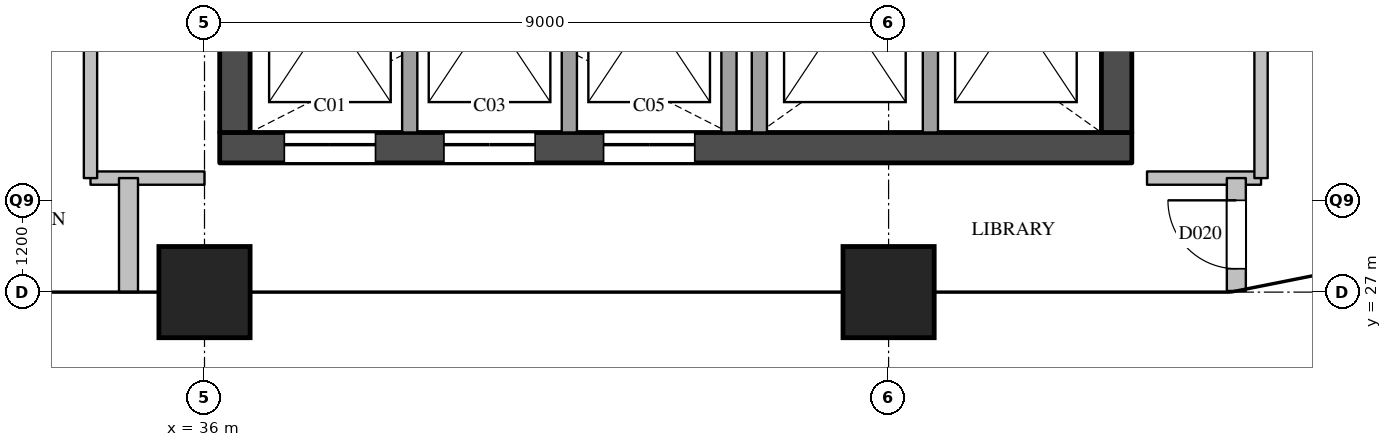
"""IFC4 building model, lengths in metres.
Left out: names, types, materials, properties, quantities, classifications, styles, units other than length and angle.
Written with IfcOpenShell. Run it as: python <this file> out.ifc"""

import sys

from ifc_helpers import new_model, si_unit, direction, frame, frame_2d, origin, origin_2d, place, context, subcontext, project, spatial, rectangle, extrude, element, fill, save


model = new_model("IFC4")
c1 = context("Model", 3, precision=1e-05, world=origin(), true_north=direction((0.0, 1.0)))
c2 = subcontext(c1, "Body", "Model", "MODEL_VIEW")
j1 = project(units=[si_unit("LENGTHUNIT", "METRE"), si_unit("PLANEANGLEUNIT", "RADIAN")], contexts=[c1])
p1 = place(None, origin())
s1 = spatial("IfcSite", under=j1, at=p1, CompositionType="ELEMENT")
p2 = place(p1, origin())
s2 = spatial("IfcBuilding", under=s1, at=p2, CompositionType="ELEMENT")
p3 = place(p2, frame((0.0, 0.0, 250.1)))
s3 = spatial("IfcBuildingStorey", under=s2, at=p3, CompositionType="ELEMENT", Elevation=250.1)
for number, where, z_axis, x_axis in (
    (1, (36.0, 27.0, 0.0), (0.0, 0.0, 1.0), (1.0, 0.0, 0.0)),
    (2, (45.0, 27.0, 0.0), (0.0, 0.0, 1.0), (1.0, 0.0, 0.0)),
):
    element("IfcColumn", number, at=place(p3, frame(where, z_axis=z_axis, x_axis=x_axis)), inside=s3, PredefinedType="COLUMN", context=c2, shape_type="SweptSolid", body=[
        extrude(rectangle(XDim=1.2, YDim=1.2, at=origin_2d()), origin(), (0.0, 0.0, 1.0), 3.9),
    ])
p4 = place(p3, frame((36.2, 28.9, 0.0), z_axis=(0.0, 0.0, 1.0), x_axis=(1.0, 0.0, 0.0)))
e3 = element("IfcWall", 3, at=p4, inside=s3, PredefinedType="SHEAR", context=c2, shape_type="SweptSolid", body=[
    extrude(rectangle(XDim=12.0, YDim=0.4, at=frame_2d((6.0, 0.0))), origin(), (0.0, 0.0, 1.0), 3.6),
])
p5 = place(p4, frame((0.85, 0.0, 0.0)))
e4 = element("IfcOpeningElement", 4, at=p5, cuts=e3, PredefinedType="OPENING", context=c2, shape_type="SweptSolid", body=[
    extrude(rectangle(XDim=1.2, YDim=2.1, at=frame_2d((0.6, 1.05))), frame((0.0, 0.21, 0.0), z_axis=(0.0, -1.0, 0.0), x_axis=(1.0, 0.0, 0.0)), (0.0, 0.0, 1.0), 0.42),
])
p6 = place(p4, frame((2.95, 0.0, 0.0)))
e5 = element("IfcOpeningElement", 5, at=p6, cuts=e3, PredefinedType="OPENING", context=c2, shape_type="SweptSolid", body=[
    extrude(rectangle(XDim=1.2, YDim=2.1, at=frame_2d((0.6, 1.05))), frame((0.0, 0.21, 0.0), z_axis=(0.0, -1.0, 0.0), x_axis=(1.0, 0.0, 0.0)), (0.0, 0.0, 1.0), 0.42),
])
p7 = place(p4, frame((5.05, 0.0, 0.0)))
e6 = element("IfcOpeningElement", 6, at=p7, cuts=e3, PredefinedType="OPENING", context=c2, shape_type="SweptSolid", body=[
    extrude(rectangle(XDim=1.2, YDim=2.1, at=frame_2d((0.6, 1.05))), frame((0.0, 0.21, 0.0), z_axis=(0.0, -1.0, 0.0), x_axis=(1.0, 0.0, 0.0)), (0.0, 0.0, 1.0), 0.42),
])
p8 = place(p3, frame((36.4, 29.1, 0.0), z_axis=(0.0, 0.0, 1.0), x_axis=(0.0, 1.0, 0.0)))
e7 = element("IfcWall", 7, at=p8, inside=s3, PredefinedType="SHEAR", context=c2, shape_type="SweptSolid", body=[
    extrude(rectangle(XDim=20.3, YDim=0.4, at=frame_2d((10.15, 0.0))), origin(), (0.0, 0.0, 1.0), 3.6),
])
p9 = place(p8, frame((3.6, 0.0, 0.0)))
e8 = element("IfcOpeningElement", 8, at=p9, cuts=e7, PredefinedType="OPENING", context=c2, shape_type="SweptSolid", body=[
    extrude(rectangle(XDim=1.8, YDim=2.1, at=frame_2d((0.9, 1.05))), frame((0.0, 0.21, 0.0), z_axis=(0.0, -1.0, 0.0), x_axis=(1.0, 0.0, 0.0)), (0.0, 0.0, 1.0), 0.42),
])
p10 = place(p8, frame((16.4, 0.0, 0.0)))
e9 = element("IfcOpeningElement", 9, at=p10, cuts=e7, PredefinedType="OPENING", context=c2, shape_type="SweptSolid", body=[
    extrude(rectangle(XDim=1.0, YDim=2.1, at=frame_2d((0.5, 1.05))), frame((0.0, 0.21, 0.0), z_axis=(0.0, -1.0, 0.0), x_axis=(1.0, 0.0, 0.0)), (0.0, 0.0, 1.0), 0.42),
])
p11 = place(p3, frame((48.0, 29.1, 0.0), z_axis=(0.0, 0.0, 1.0), x_axis=(0.0, 1.0, 0.0)))
e10 = element("IfcWall", 10, at=p11, inside=s3, PredefinedType="SHEAR", context=c2, shape_type="SweptSolid", body=[
    extrude(rectangle(XDim=20.3, YDim=0.4, at=frame_2d((10.15, 0.0))), origin(), (0.0, 0.0, 1.0), 3.6),
])
p12 = place(p11, frame((12.5, 0.0, 0.0)))
e11 = element("IfcOpeningElement", 11, at=p12, cuts=e10, PredefinedType="OPENING", context=c2, shape_type="SweptSolid", body=[
    extrude(rectangle(XDim=0.7, YDim=2.1, at=frame_2d((0.35, 1.05))), frame((0.0, 0.21, 0.0), z_axis=(0.0, -1.0, 0.0), x_axis=(1.0, 0.0, 0.0)), (0.0, 0.0, 1.0), 0.42),
])
p13 = place(p11, frame((3.9, 0.0, 0.0)))
e12 = element("IfcOpeningElement", 12, at=p13, cuts=e10, PredefinedType="OPENING", context=c2, shape_type="SweptSolid", body=[
    extrude(rectangle(XDim=1.8, YDim=2.1, at=frame_2d((0.9, 1.05))), frame((0.0, 0.21, 0.0), z_axis=(0.0, -1.0, 0.0), x_axis=(1.0, 0.0, 0.0)), (0.0, 0.0, 1.0), 0.42),
])
for number, where, z_axis, x_axis in (
    (13, (38.7, 29.1, 0.0), (0.0, 0.0, 1.0), (0.0, 1.0, 0.0)),
    (14, (40.8, 29.1, 0.0), (0.0, 0.0, 1.0), (0.0, 1.0, 0.0)),
    (15, (42.9, 29.1, 0.0), (0.0, 0.0, 1.0), (0.0, 1.0, 0.0)),
):
    element("IfcWall", number, at=place(p3, frame(where, z_axis=z_axis, x_axis=x_axis)), inside=s3, PredefinedType="SOLIDWALL", context=c2, shape_type="SweptSolid", body=[
        extrude(rectangle(XDim=3.2, YDim=0.2, at=frame_2d((1.6, 0.0))), origin(), (0.0, 0.0, 1.0), 3.6),
    ])
p14 = place(p3, frame((43.3, 29.1, 0.0), z_axis=(0.0, 0.0, 1.0), x_axis=(0.0, 1.0, 0.0)))
e16 = element("IfcWall", 16, at=p14, inside=s3, PredefinedType="SOLIDWALL", context=c2, shape_type="SweptSolid", body=[
    extrude(rectangle(XDim=9.9, YDim=0.2, at=frame_2d((4.95, 0.0))), origin(), (0.0, 0.0, 1.0), 3.6),
])
p15 = place(p3, frame((45.55, 29.1, 0.0), z_axis=(0.0, 0.0, 1.0), x_axis=(0.0, 1.0, 0.0)))
e17 = element("IfcWall", 17, at=p15, inside=s3, PredefinedType="SOLIDWALL", context=c2, shape_type="SweptSolid", body=[
    extrude(rectangle(XDim=3.2, YDim=0.2, at=frame_2d((1.6, 0.0))), origin(), (0.0, 0.0, 1.0), 3.6),
])
for number, where, z_axis, x_axis in (
    (18, (34.5, 28.5, 0.0), (0.0, 0.0, 1.0), (1.0, 0.0, 0.0)),
    (19, (48.4, 28.5, 0.0), (0.0, 0.0, 1.0), (1.0, 0.0, 0.0)),
):
    element("IfcWall", number, at=place(p3, frame(where, z_axis=z_axis, x_axis=x_axis)), inside=s3, PredefinedType="PARTITIONING", context=c2, shape_type="SweptSolid", body=[
        extrude(rectangle(XDim=1.5, YDim=0.175, at=frame_2d((0.75, 0.0))), origin(), (0.0, 0.0, 1.0), 3.6),
    ])
p16 = place(p3, frame((34.5, 28.5, 0.0), z_axis=(0.0, 0.0, 1.0), x_axis=(0.0, 1.0, 0.0)))
e20 = element("IfcWall", 20, at=p16, inside=s3, PredefinedType="PARTITIONING", context=c2, shape_type="SweptSolid", body=[
    extrude(rectangle(XDim=15.7, YDim=0.175, at=frame_2d((7.85, 0.0))), origin(), (0.0, 0.0, 1.0), 3.6),
])
p17 = place(p16, frame((10.1, 0.0, 0.0)))
e21 = element("IfcOpeningElement", 21, at=p17, cuts=e20, PredefinedType="OPENING", context=c2, shape_type="SweptSolid", body=[
    extrude(rectangle(XDim=1.0, YDim=2.1, at=frame_2d((0.5, 1.05))), frame((0.0, 0.097, 0.0), z_axis=(0.0, -1.0, 0.0), x_axis=(1.0, 0.0, 0.0)), (0.0, 0.0, 1.0), 0.195),
])
p18 = place(p16, frame((11.9, 0.0, 0.0)))
e22 = element("IfcOpeningElement", 22, at=p18, cuts=e20, PredefinedType="OPENING", context=c2, shape_type="SweptSolid", body=[
    extrude(rectangle(XDim=1.0, YDim=2.1, at=frame_2d((0.5, 1.05))), frame((0.0, 0.097, 0.0), z_axis=(0.0, -1.0, 0.0), x_axis=(1.0, 0.0, 0.0)), (0.0, 0.0, 1.0), 0.195),
])
p19 = place(p3, frame((49.9, 28.5, 0.0), z_axis=(0.0, 0.0, 1.0), x_axis=(0.0, 1.0, 0.0)))
e23 = element("IfcWall", 23, at=p19, inside=s3, PredefinedType="PARTITIONING", context=c2, shape_type="SweptSolid", body=[
    extrude(rectangle(XDim=23.0, YDim=0.175, at=frame_2d((11.5, 0.0))), origin(), (0.0, 0.0, 1.0), 3.6),
])
p20 = place(p19, frame((7.8, 0.0, 0.0)))
e24 = element("IfcOpeningElement", 24, at=p20, cuts=e23, PredefinedType="OPENING", context=c2, shape_type="SweptSolid", body=[
    extrude(rectangle(XDim=0.9, YDim=2.1, at=frame_2d((0.45, 1.05))), frame((0.0, 0.097, 0.0), z_axis=(0.0, -1.0, 0.0), x_axis=(1.0, 0.0, 0.0)), (0.0, 0.0, 1.0), 0.195),
])
p21 = place(p19, frame((19.3, 0.0, 0.0)))
e25 = element("IfcOpeningElement", 25, at=p21, cuts=e23, PredefinedType="OPENING", context=c2, shape_type="SweptSolid", body=[
    extrude(rectangle(XDim=0.9, YDim=2.1, at=frame_2d((0.45, 1.05))), frame((0.0, 0.097, 0.0), z_axis=(0.0, -1.0, 0.0), x_axis=(1.0, 0.0, 0.0)), (0.0, 0.0, 1.0), 0.195),
])
p22 = place(p3, frame((35.0, 27.0, 0.0), z_axis=(0.0, 0.0, 1.0), x_axis=(0.0, 1.0, 0.0)))
e26 = element("IfcWall", 26, at=p22, inside=s3, PredefinedType="PARTITIONING", context=c2, shape_type="SweptSolid", body=[
    extrude(rectangle(XDim=1.5, YDim=0.25, at=frame_2d((0.75, 0.0))), origin(), (0.0, 0.0, 1.0), 2.6),
])
p23 = place(p3, frame((49.575, 27.015, 0.0), z_axis=(0.0, 0.0, 1.0), x_axis=(0.0, 1.0, 0.0)))
e27 = element("IfcWall", 27, at=p23, inside=s3, PredefinedType="PARTITIONING", context=c2, shape_type="SweptSolid", body=[
    extrude(rectangle(XDim=1.485, YDim=0.25, at=frame_2d((0.743, 0.0))), origin(), (0.0, 0.0, 1.0), 2.6),
])
p24 = place(p23, frame((0.292, 0.0, 0.0)))
e28 = element("IfcOpeningElement", 28, at=p24, cuts=e27, PredefinedType="OPENING", context=c2, shape_type="SweptSolid", body=[
    extrude(rectangle(XDim=0.9, YDim=2.1, at=frame_2d((0.45, 1.05))), frame((0.0, 0.135, 0.0), z_axis=(0.0, -1.0, 0.0), x_axis=(1.0, 0.0, 0.0)), (0.0, 0.0, 1.0), 0.27),
])
p25 = place(p5, origin())
e29 = element("IfcDoor", 29, at=p25, inside=s3, OperationType="SLIDING_TO_LEFT", PredefinedType="DOOR", context=c2, shape_type="SweptSolid", body=[
    extrude(rectangle(XDim=1.2, YDim=2.1, at=frame_2d((0.6, 1.05))), frame((0.0, 0.025, 0.0), z_axis=(0.0, -1.0, 0.0), x_axis=(1.0, 0.0, 0.0)), (0.0, 0.0, 1.0), 0.05),
])
fill(e4, e29)
p26 = place(p6, origin())
e30 = element("IfcDoor", 30, at=p26, inside=s3, OperationType="SLIDING_TO_LEFT", PredefinedType="DOOR", context=c2, shape_type="SweptSolid", body=[
    extrude(rectangle(XDim=1.2, YDim=2.1, at=frame_2d((0.6, 1.05))), frame((0.0, 0.025, 0.0), z_axis=(0.0, -1.0, 0.0), x_axis=(1.0, 0.0, 0.0)), (0.0, 0.0, 1.0), 0.05),
])
fill(e5, e30)
p27 = place(p7, origin())
e31 = element("IfcDoor", 31, at=p27, inside=s3, OperationType="SLIDING_TO_LEFT", PredefinedType="DOOR", context=c2, shape_type="SweptSolid", body=[
    extrude(rectangle(XDim=1.2, YDim=2.1, at=frame_2d((0.6, 1.05))), frame((0.0, 0.025, 0.0), z_axis=(0.0, -1.0, 0.0), x_axis=(1.0, 0.0, 0.0)), (0.0, 0.0, 1.0), 0.05),
])
fill(e6, e31)
p28 = place(p24, origin())
e32 = element("IfcDoor", 32, at=p28, inside=s3, OperationType="SINGLE_SWING_RIGHT", PredefinedType="DOOR", context=c2, shape_type="SweptSolid", body=[
    extrude(rectangle(XDim=0.9, YDim=2.1, at=frame_2d((0.45, 1.05))), frame((0.0, 0.025, 0.0), z_axis=(0.0, -1.0, 0.0), x_axis=(1.0, 0.0, 0.0)), (0.0, 0.0, 1.0), 0.05),
])
fill(e28, e32)
save(model, sys.argv[1])
